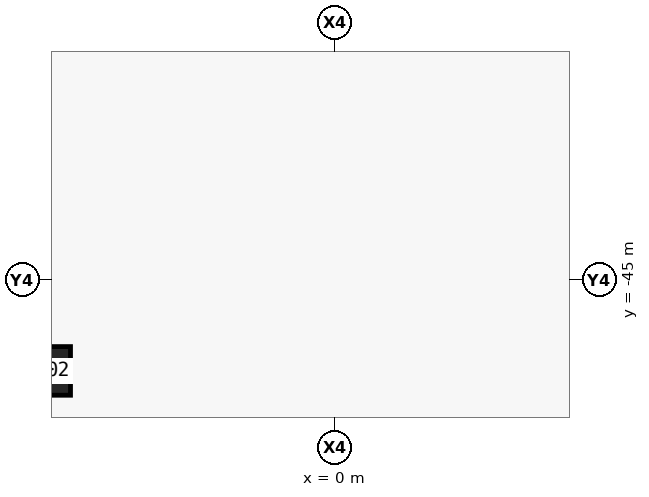
"""IFC4 building model, lengths in metres.
Left out: names, types, materials, properties, quantities, classifications, styles, units other than length and angle.
Written with IfcOpenShell. Run it as: python <this file> out.ifc"""

import sys

from ifc_helpers import new_model, si_unit, direction, frame, origin, origin_2d, place, context, subcontext, project, spatial, rectangle, extrude, element, save


model = new_model("IFC4")
c1 = context("Model", 3, precision=1e-05, world=origin(), true_north=direction((0.0, 1.0)))
c2 = subcontext(c1, "Body", "Model", "MODEL_VIEW")
j1 = project(units=[si_unit("LENGTHUNIT", "METRE"), si_unit("PLANEANGLEUNIT", "RADIAN")], contexts=[c1])
p1 = place(None, origin())
s1 = spatial("IfcSite", under=j1, at=p1, CompositionType="ELEMENT")
p2 = place(p1, origin())
s2 = spatial("IfcBuilding", under=s1, at=p2, CompositionType="ELEMENT")
p3 = place(p2, frame((0.0, 0.0, -4.5)))
s3 = spatial("IfcBuildingStorey", under=s2, at=p3, CompositionType="ELEMENT", Elevation=-4.5)
p4 = place(p3, frame((-9.5, -48.0, 0.0), z_axis=(0.0, 0.0, 1.0), x_axis=(1.0, 0.0, 0.0)))
e1 = element("IfcColumn", 1, at=p4, inside=s3, PredefinedType="COLUMN", context=c2, shape_type="SweptSolid", body=[
    extrude(rectangle(XDim=1.6, YDim=1.6, at=origin_2d()), origin(), (0.0, 0.0, 1.0), 4.5),
])
save(model, sys.argv[1])
